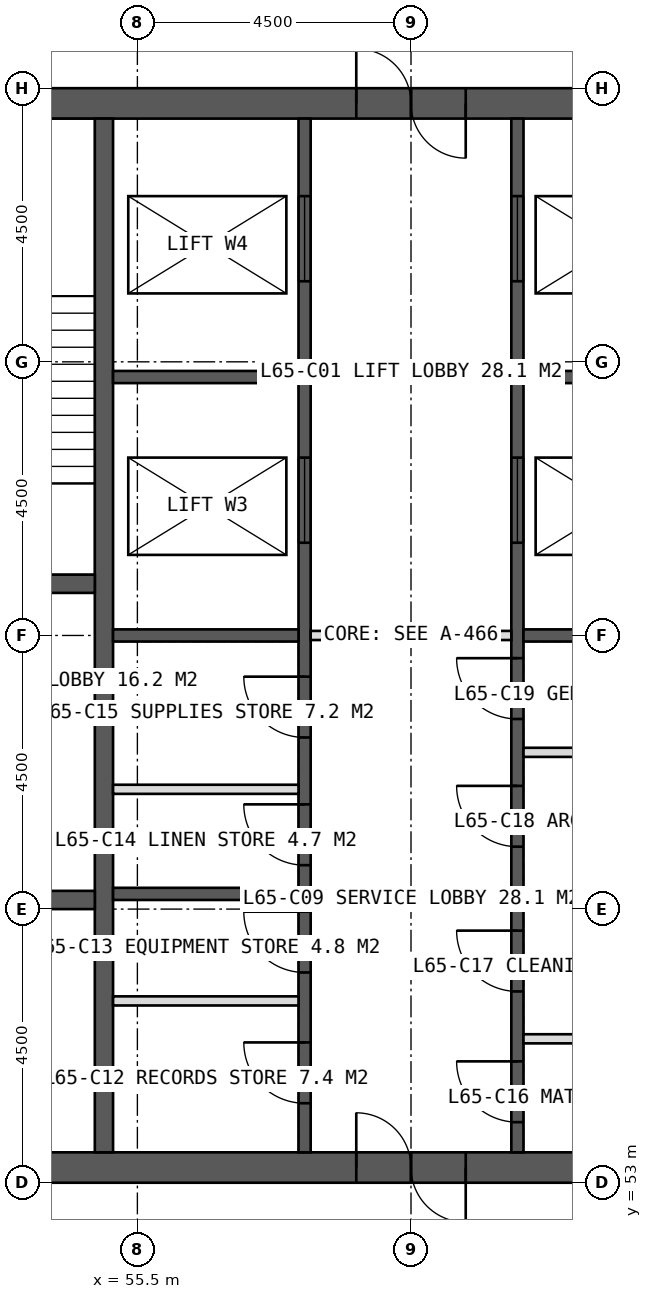
"""IFC4 building model, lengths in metres.
Left out: names, types, materials, properties, quantities, classifications, styles, units other than length and angle.
Written with IfcOpenShell. Run it as: python <this file> out.ifc"""

import sys

from ifc_helpers import new_model, si_unit, direction, frame, frame_2d, origin, place, context, subcontext, project, spatial, rectangle, extrude, element, fill, save


model = new_model("IFC4")
c1 = context("Model", 3, precision=1e-05, world=origin(), true_north=direction((0.0, 1.0)))
c2 = subcontext(c1, "Body", "Model", "MODEL_VIEW")
j1 = project(units=[si_unit("LENGTHUNIT", "METRE"), si_unit("PLANEANGLEUNIT", "RADIAN")], contexts=[c1])
p1 = place(None, origin())
s1 = spatial("IfcSite", under=j1, at=p1, CompositionType="ELEMENT")
p2 = place(p1, origin())
s2 = spatial("IfcBuilding", under=s1, at=p2, CompositionType="ELEMENT")
p3 = place(p2, frame((0.0, 0.0, 270.0)))
s3 = spatial("IfcBuildingStorey", under=s2, at=p3, CompositionType="ELEMENT", Elevation=270.0)
p4 = place(p3, frame((51.0, 70.75, 0.0), z_axis=(0.0, 0.0, 1.0), x_axis=(1.0, 0.0, 0.0)))
e1 = element("IfcWall", 1, at=p4, inside=s3, PredefinedType="SHEAR", context=c2, shape_type="SweptSolid", body=[
    extrude(rectangle(XDim=18.0, YDim=0.5, at=frame_2d((9.0, 0.0))), origin(), (0.0, 0.0, 1.0), 4.0),
])
p5 = place(p4, frame((8.1, 0.0, 0.0)))
e2 = element("IfcOpeningElement", 2, at=p5, cuts=e1, PredefinedType="OPENING", context=c2, shape_type="SweptSolid", body=[
    extrude(rectangle(XDim=1.8, YDim=2.2, at=frame_2d((0.9, 1.1))), frame((0.0, 0.26, 0.0), z_axis=(0.0, -1.0, 0.0), x_axis=(1.0, 0.0, 0.0)), (0.0, 0.0, 1.0), 0.52),
])
p6 = place(p3, frame((51.0, 53.25, 0.0), z_axis=(0.0, 0.0, 1.0), x_axis=(1.0, 0.0, 0.0)))
e3 = element("IfcWall", 3, at=p6, inside=s3, PredefinedType="SHEAR", context=c2, shape_type="SweptSolid", body=[
    extrude(rectangle(XDim=18.0, YDim=0.5, at=frame_2d((9.0, 0.0))), origin(), (0.0, 0.0, 1.0), 4.0),
])
p7 = place(p6, frame((8.1, 0.0, 0.0)))
e4 = element("IfcOpeningElement", 4, at=p7, cuts=e3, PredefinedType="OPENING", context=c2, shape_type="SweptSolid", body=[
    extrude(rectangle(XDim=1.8, YDim=2.2, at=frame_2d((0.9, 1.1))), frame((0.0, 0.26, 0.0), z_axis=(0.0, -1.0, 0.0), x_axis=(1.0, 0.0, 0.0)), (0.0, 0.0, 1.0), 0.52),
])
p8 = place(p3, frame((54.95, 53.5, 0.0), z_axis=(0.0, 0.0, 1.0), x_axis=(0.0, 1.0, 0.0)))
e5 = element("IfcWall", 5, at=p8, inside=s3, PredefinedType="SHEAR", context=c2, shape_type="SweptSolid", body=[
    extrude(rectangle(XDim=17.0, YDim=0.3, at=frame_2d((8.5, 0.0))), origin(), (0.0, 0.0, 1.0), 4.0),
])
p9 = place(p3, frame((58.25, 53.5, 0.0), z_axis=(0.0, 0.0, 1.0), x_axis=(0.0, 1.0, 0.0)))
e6 = element("IfcWall", 6, at=p9, inside=s3, PredefinedType="SHEAR", context=c2, shape_type="SweptSolid", body=[
    extrude(rectangle(XDim=17.0, YDim=0.2, at=frame_2d((8.5, 0.0))), origin(), (0.0, 0.0, 1.0), 4.0),
])
p10 = place(p9, frame((0.808, 0.0, 0.0)))
e7 = element("IfcOpeningElement", 7, at=p10, cuts=e6, PredefinedType="OPENING", context=c2, shape_type="SweptSolid", body=[
    extrude(rectangle(XDim=1.0, YDim=2.1, at=frame_2d((0.5, 1.05))), frame((0.0, 0.11, 0.0), z_axis=(0.0, -1.0, 0.0), x_axis=(1.0, 0.0, 0.0)), (0.0, 0.0, 1.0), 0.22),
])
p11 = place(p9, frame((2.958, 0.0, 0.0)))
e8 = element("IfcOpeningElement", 8, at=p11, cuts=e6, PredefinedType="OPENING", context=c2, shape_type="SweptSolid", body=[
    extrude(rectangle(XDim=1.0, YDim=2.1, at=frame_2d((0.5, 1.05))), frame((0.0, 0.11, 0.0), z_axis=(0.0, -1.0, 0.0), x_axis=(1.0, 0.0, 0.0)), (0.0, 0.0, 1.0), 0.22),
])
p12 = place(p9, frame((4.722, 0.0, 0.0)))
e9 = element("IfcOpeningElement", 9, at=p12, cuts=e6, PredefinedType="OPENING", context=c2, shape_type="SweptSolid", body=[
    extrude(rectangle(XDim=1.0, YDim=2.1, at=frame_2d((0.5, 1.05))), frame((0.0, 0.11, 0.0), z_axis=(0.0, -1.0, 0.0), x_axis=(1.0, 0.0, 0.0)), (0.0, 0.0, 1.0), 0.22),
])
p13 = place(p9, frame((6.823, 0.0, 0.0)))
e10 = element("IfcOpeningElement", 10, at=p13, cuts=e6, PredefinedType="OPENING", context=c2, shape_type="SweptSolid", body=[
    extrude(rectangle(XDim=1.0, YDim=2.1, at=frame_2d((0.5, 1.05))), frame((0.0, 0.11, 0.0), z_axis=(0.0, -1.0, 0.0), x_axis=(1.0, 0.0, 0.0)), (0.0, 0.0, 1.0), 0.22),
])
p14 = place(p9, frame((10.025, 0.0, 0.0)))
e11 = element("IfcOpeningElement", 11, at=p14, cuts=e6, PredefinedType="OPENING", context=c2, shape_type="SweptSolid", body=[
    extrude(rectangle(XDim=1.4, YDim=2.2, at=frame_2d((0.7, 1.1))), frame((0.0, 0.11, 0.0), z_axis=(0.0, -1.0, 0.0), x_axis=(1.0, 0.0, 0.0)), (0.0, 0.0, 1.0), 0.22),
])
p15 = place(p9, frame((14.325, 0.0, 0.0)))
e12 = element("IfcOpeningElement", 12, at=p15, cuts=e6, PredefinedType="OPENING", context=c2, shape_type="SweptSolid", body=[
    extrude(rectangle(XDim=1.4, YDim=2.2, at=frame_2d((0.7, 1.1))), frame((0.0, 0.11, 0.0), z_axis=(0.0, -1.0, 0.0), x_axis=(1.0, 0.0, 0.0)), (0.0, 0.0, 1.0), 0.22),
])
p16 = place(p3, frame((61.75, 53.5, 0.0), z_axis=(0.0, 0.0, 1.0), x_axis=(0.0, 1.0, 0.0)))
e13 = element("IfcWall", 13, at=p16, inside=s3, PredefinedType="SHEAR", context=c2, shape_type="SweptSolid", body=[
    extrude(rectangle(XDim=17.0, YDim=0.2, at=frame_2d((8.5, 0.0))), origin(), (0.0, 0.0, 1.0), 4.0),
])
p17 = place(p16, frame((0.496, 0.0, 0.0)))
e14 = element("IfcOpeningElement", 14, at=p17, cuts=e13, PredefinedType="OPENING", context=c2, shape_type="SweptSolid", body=[
    extrude(rectangle(XDim=1.0, YDim=2.1, at=frame_2d((0.5, 1.05))), frame((0.0, 0.11, 0.0), z_axis=(0.0, -1.0, 0.0), x_axis=(1.0, 0.0, 0.0)), (0.0, 0.0, 1.0), 0.22),
])
p18 = place(p16, frame((2.646, 0.0, 0.0)))
e15 = element("IfcOpeningElement", 15, at=p18, cuts=e13, PredefinedType="OPENING", context=c2, shape_type="SweptSolid", body=[
    extrude(rectangle(XDim=1.0, YDim=2.1, at=frame_2d((0.5, 1.05))), frame((0.0, 0.11, 0.0), z_axis=(0.0, -1.0, 0.0), x_axis=(1.0, 0.0, 0.0)), (0.0, 0.0, 1.0), 0.22),
])
p19 = place(p16, frame((5.027, 0.0, 0.0)))
e16 = element("IfcOpeningElement", 16, at=p19, cuts=e13, PredefinedType="OPENING", context=c2, shape_type="SweptSolid", body=[
    extrude(rectangle(XDim=1.0, YDim=2.1, at=frame_2d((0.5, 1.05))), frame((0.0, 0.11, 0.0), z_axis=(0.0, -1.0, 0.0), x_axis=(1.0, 0.0, 0.0)), (0.0, 0.0, 1.0), 0.22),
])
p20 = place(p16, frame((7.126, 0.0, 0.0)))
e17 = element("IfcOpeningElement", 17, at=p20, cuts=e13, PredefinedType="OPENING", context=c2, shape_type="SweptSolid", body=[
    extrude(rectangle(XDim=1.0, YDim=2.1, at=frame_2d((0.5, 1.05))), frame((0.0, 0.11, 0.0), z_axis=(0.0, -1.0, 0.0), x_axis=(1.0, 0.0, 0.0)), (0.0, 0.0, 1.0), 0.22),
])
p21 = place(p16, frame((10.025, 0.0, 0.0)))
e18 = element("IfcOpeningElement", 18, at=p21, cuts=e13, PredefinedType="OPENING", context=c2, shape_type="SweptSolid", body=[
    extrude(rectangle(XDim=1.4, YDim=2.2, at=frame_2d((0.7, 1.1))), frame((0.0, 0.11, 0.0), z_axis=(0.0, -1.0, 0.0), x_axis=(1.0, 0.0, 0.0)), (0.0, 0.0, 1.0), 0.22),
])
p22 = place(p16, frame((14.325, 0.0, 0.0)))
e19 = element("IfcOpeningElement", 19, at=p22, cuts=e13, PredefinedType="OPENING", context=c2, shape_type="SweptSolid", body=[
    extrude(rectangle(XDim=1.4, YDim=2.2, at=frame_2d((0.7, 1.1))), frame((0.0, 0.11, 0.0), z_axis=(0.0, -1.0, 0.0), x_axis=(1.0, 0.0, 0.0)), (0.0, 0.0, 1.0), 0.22),
])
for number, where, z_axis, x_axis in (
    (20, (55.1, 57.75, 0.0), (0.0, 0.0, 1.0), (1.0, 0.0, 0.0)),
    (21, (61.85, 57.75, 0.0), (0.0, 0.0, 1.0), (1.0, 0.0, 0.0)),
    (22, (55.1, 62.0, 0.0), (0.0, 0.0, 1.0), (1.0, 0.0, 0.0)),
    (23, (61.85, 62.0, 0.0), (0.0, 0.0, 1.0), (1.0, 0.0, 0.0)),
    (24, (55.1, 66.25, 0.0), (0.0, 0.0, 1.0), (1.0, 0.0, 0.0)),
    (25, (61.85, 66.25, 0.0), (0.0, 0.0, 1.0), (1.0, 0.0, 0.0)),
):
    element("IfcWall", number, at=place(p3, frame(where, z_axis=z_axis, x_axis=x_axis)), inside=s3, PredefinedType="SHEAR", context=c2, shape_type="SweptSolid", body=[
        extrude(rectangle(XDim=3.05, YDim=0.2, at=frame_2d((1.525, 0.0))), origin(), (0.0, 0.0, 1.0), 4.0),
    ])
p23 = place(p3, frame((51.5, 62.85, 0.0), z_axis=(0.0, 0.0, 1.0), x_axis=(1.0, 0.0, 0.0)))
e26 = element("IfcWall", 26, at=p23, inside=s3, PredefinedType="SHEAR", context=c2, shape_type="SweptSolid", body=[
    extrude(rectangle(XDim=3.3, YDim=0.3, at=frame_2d((1.65, 0.0))), origin(), (0.0, 0.0, 1.0), 4.0),
])
p24 = place(p23, frame((1.15, 0.0, 0.0)))
e27 = element("IfcOpeningElement", 27, at=p24, cuts=e26, PredefinedType="OPENING", context=c2, shape_type="SweptSolid", body=[
    extrude(rectangle(XDim=1.2, YDim=2.1, at=frame_2d((0.6, 1.05))), frame((0.0, 0.16, 0.0), z_axis=(0.0, -1.0, 0.0), x_axis=(1.0, 0.0, 0.0)), (0.0, 0.0, 1.0), 0.32),
])
p25 = place(p3, frame((51.5, 57.65, 0.0), z_axis=(0.0, 0.0, 1.0), x_axis=(1.0, 0.0, 0.0)))
e28 = element("IfcWall", 28, at=p25, inside=s3, PredefinedType="SHEAR", context=c2, shape_type="SweptSolid", body=[
    extrude(rectangle(XDim=3.3, YDim=0.3, at=frame_2d((1.65, 0.0))), origin(), (0.0, 0.0, 1.0), 4.0),
])
p26 = place(p25, frame((1.15, 0.0, 0.0)))
e29 = element("IfcOpeningElement", 29, at=p26, cuts=e28, PredefinedType="OPENING", context=c2, shape_type="SweptSolid", body=[
    extrude(rectangle(XDim=1.2, YDim=2.2, at=frame_2d((0.6, 1.1))), frame((0.0, 0.16, 0.0), z_axis=(0.0, -1.0, 0.0), x_axis=(1.0, 0.0, 0.0)), (0.0, 0.0, 1.0), 0.32),
])
for number, where, z_axis, x_axis in (
    (30, (55.1, 55.99, 0.0), (0.0, 0.0, 1.0), (1.0, 0.0, 0.0)),
    (31, (61.85, 55.367, 0.0), (0.0, 0.0, 1.0), (1.0, 0.0, 0.0)),
    (32, (55.1, 59.47, 0.0), (0.0, 0.0, 1.0), (1.0, 0.0, 0.0)),
    (33, (61.85, 60.078, 0.0), (0.0, 0.0, 1.0), (1.0, 0.0, 0.0)),
):
    element("IfcWall", number, at=place(p3, frame(where, z_axis=z_axis, x_axis=x_axis)), inside=s3, PredefinedType="PARTITIONING", context=c2, shape_type="SweptSolid", body=[
        extrude(rectangle(XDim=3.05, YDim=0.15, at=frame_2d((1.525, 0.0))), origin(), (0.0, 0.0, 1.0), 3.75),
    ])
p27 = place(p3, frame((58.35, 62.0, 0.0), z_axis=(0.0, 0.0, 1.0), x_axis=(1.0, 0.0, 0.0)))
e34 = element("IfcWall", 34, at=p27, inside=s3, PredefinedType="PARTITIONING", context=c2, shape_type="SweptSolid", body=[
    extrude(rectangle(XDim=3.3, YDim=0.15, at=frame_2d((1.65, 0.0))), origin(), (0.0, 0.0, 1.0), 3.75),
])
p28 = place(p5, origin())
e35 = element("IfcDoor", 35, at=p28, inside=s3, OperationType="DOUBLE_DOOR_SINGLE_SWING", PredefinedType="DOOR", context=c2, shape_type="SweptSolid", body=[
    extrude(rectangle(XDim=1.8, YDim=2.2, at=frame_2d((0.9, 1.1))), frame((0.0, 0.025, 0.0), z_axis=(0.0, -1.0, 0.0), x_axis=(1.0, 0.0, 0.0)), (0.0, 0.0, 1.0), 0.05),
])
fill(e2, e35)
p29 = place(p10, origin())
e36 = element("IfcDoor", 36, at=p29, inside=s3, OperationType="SINGLE_SWING_RIGHT", PredefinedType="DOOR", context=c2, shape_type="SweptSolid", body=[
    extrude(rectangle(XDim=1.0, YDim=2.1, at=frame_2d((0.5, 1.05))), frame((0.0, 0.025, 0.0), z_axis=(0.0, -1.0, 0.0), x_axis=(1.0, 0.0, 0.0)), (0.0, 0.0, 1.0), 0.05),
])
fill(e7, e36)
p30 = place(p11, origin())
e37 = element("IfcDoor", 37, at=p30, inside=s3, OperationType="SINGLE_SWING_RIGHT", PredefinedType="DOOR", context=c2, shape_type="SweptSolid", body=[
    extrude(rectangle(XDim=1.0, YDim=2.1, at=frame_2d((0.5, 1.05))), frame((0.0, 0.025, 0.0), z_axis=(0.0, -1.0, 0.0), x_axis=(1.0, 0.0, 0.0)), (0.0, 0.0, 1.0), 0.05),
])
fill(e8, e37)
p31 = place(p17, origin())
e38 = element("IfcDoor", 38, at=p31, inside=s3, OperationType="SINGLE_SWING_RIGHT", PredefinedType="DOOR", context=c2, shape_type="SweptSolid", body=[
    extrude(rectangle(XDim=1.0, YDim=2.1, at=frame_2d((0.5, 1.05))), frame((0.0, 0.025, 0.0), z_axis=(0.0, -1.0, 0.0), x_axis=(1.0, 0.0, 0.0)), (0.0, 0.0, 1.0), 0.05),
])
fill(e14, e38)
p32 = place(p18, origin())
e39 = element("IfcDoor", 39, at=p32, inside=s3, OperationType="SINGLE_SWING_RIGHT", PredefinedType="DOOR", context=c2, shape_type="SweptSolid", body=[
    extrude(rectangle(XDim=1.0, YDim=2.1, at=frame_2d((0.5, 1.05))), frame((0.0, 0.025, 0.0), z_axis=(0.0, -1.0, 0.0), x_axis=(1.0, 0.0, 0.0)), (0.0, 0.0, 1.0), 0.05),
])
fill(e15, e39)
p33 = place(p12, origin())
e40 = element("IfcDoor", 40, at=p33, inside=s3, OperationType="SINGLE_SWING_RIGHT", PredefinedType="DOOR", context=c2, shape_type="SweptSolid", body=[
    extrude(rectangle(XDim=1.0, YDim=2.1, at=frame_2d((0.5, 1.05))), frame((0.0, 0.025, 0.0), z_axis=(0.0, -1.0, 0.0), x_axis=(1.0, 0.0, 0.0)), (0.0, 0.0, 1.0), 0.05),
])
fill(e9, e40)
p34 = place(p13, origin())
e41 = element("IfcDoor", 41, at=p34, inside=s3, OperationType="SINGLE_SWING_RIGHT", PredefinedType="DOOR", context=c2, shape_type="SweptSolid", body=[
    extrude(rectangle(XDim=1.0, YDim=2.1, at=frame_2d((0.5, 1.05))), frame((0.0, 0.025, 0.0), z_axis=(0.0, -1.0, 0.0), x_axis=(1.0, 0.0, 0.0)), (0.0, 0.0, 1.0), 0.05),
])
fill(e10, e41)
p35 = place(p19, origin())
e42 = element("IfcDoor", 42, at=p35, inside=s3, OperationType="SINGLE_SWING_RIGHT", PredefinedType="DOOR", context=c2, shape_type="SweptSolid", body=[
    extrude(rectangle(XDim=1.0, YDim=2.1, at=frame_2d((0.5, 1.05))), frame((0.0, 0.025, 0.0), z_axis=(0.0, -1.0, 0.0), x_axis=(1.0, 0.0, 0.0)), (0.0, 0.0, 1.0), 0.05),
])
fill(e16, e42)
p36 = place(p20, origin())
e43 = element("IfcDoor", 43, at=p36, inside=s3, OperationType="SINGLE_SWING_RIGHT", PredefinedType="DOOR", context=c2, shape_type="SweptSolid", body=[
    extrude(rectangle(XDim=1.0, YDim=2.1, at=frame_2d((0.5, 1.05))), frame((0.0, 0.025, 0.0), z_axis=(0.0, -1.0, 0.0), x_axis=(1.0, 0.0, 0.0)), (0.0, 0.0, 1.0), 0.05),
])
fill(e17, e43)
p37 = place(p14, origin())
e44 = element("IfcDoor", 44, at=p37, inside=s3, OperationType="SLIDING_TO_LEFT", PredefinedType="DOOR", context=c2, shape_type="SweptSolid", body=[
    extrude(rectangle(XDim=1.4, YDim=2.2, at=frame_2d((0.7, 1.1))), frame((0.0, 0.025, 0.0), z_axis=(0.0, -1.0, 0.0), x_axis=(1.0, 0.0, 0.0)), (0.0, 0.0, 1.0), 0.05),
])
fill(e11, e44)
p38 = place(p21, origin())
e45 = element("IfcDoor", 45, at=p38, inside=s3, OperationType="SLIDING_TO_LEFT", PredefinedType="DOOR", context=c2, shape_type="SweptSolid", body=[
    extrude(rectangle(XDim=1.4, YDim=2.2, at=frame_2d((0.7, 1.1))), frame((0.0, 0.025, 0.0), z_axis=(0.0, -1.0, 0.0), x_axis=(1.0, 0.0, 0.0)), (0.0, 0.0, 1.0), 0.05),
])
fill(e18, e45)
p39 = place(p15, origin())
e46 = element("IfcDoor", 46, at=p39, inside=s3, OperationType="SLIDING_TO_LEFT", PredefinedType="DOOR", context=c2, shape_type="SweptSolid", body=[
    extrude(rectangle(XDim=1.4, YDim=2.2, at=frame_2d((0.7, 1.1))), frame((0.0, 0.025, 0.0), z_axis=(0.0, -1.0, 0.0), x_axis=(1.0, 0.0, 0.0)), (0.0, 0.0, 1.0), 0.05),
])
fill(e12, e46)
p40 = place(p22, origin())
e47 = element("IfcDoor", 47, at=p40, inside=s3, OperationType="SLIDING_TO_LEFT", PredefinedType="DOOR", context=c2, shape_type="SweptSolid", body=[
    extrude(rectangle(XDim=1.4, YDim=2.2, at=frame_2d((0.7, 1.1))), frame((0.0, 0.025, 0.0), z_axis=(0.0, -1.0, 0.0), x_axis=(1.0, 0.0, 0.0)), (0.0, 0.0, 1.0), 0.05),
])
fill(e19, e47)
p41 = place(p7, origin())
e48 = element("IfcDoor", 48, at=p41, inside=s3, OperationType="DOUBLE_DOOR_SINGLE_SWING", PredefinedType="DOOR", context=c2, shape_type="SweptSolid", body=[
    extrude(rectangle(XDim=1.8, YDim=2.2, at=frame_2d((0.9, 1.1))), frame((0.0, 0.025, 0.0), z_axis=(0.0, -1.0, 0.0), x_axis=(1.0, 0.0, 0.0)), (0.0, 0.0, 1.0), 0.05),
])
fill(e4, e48)
save(model, sys.argv[1])
